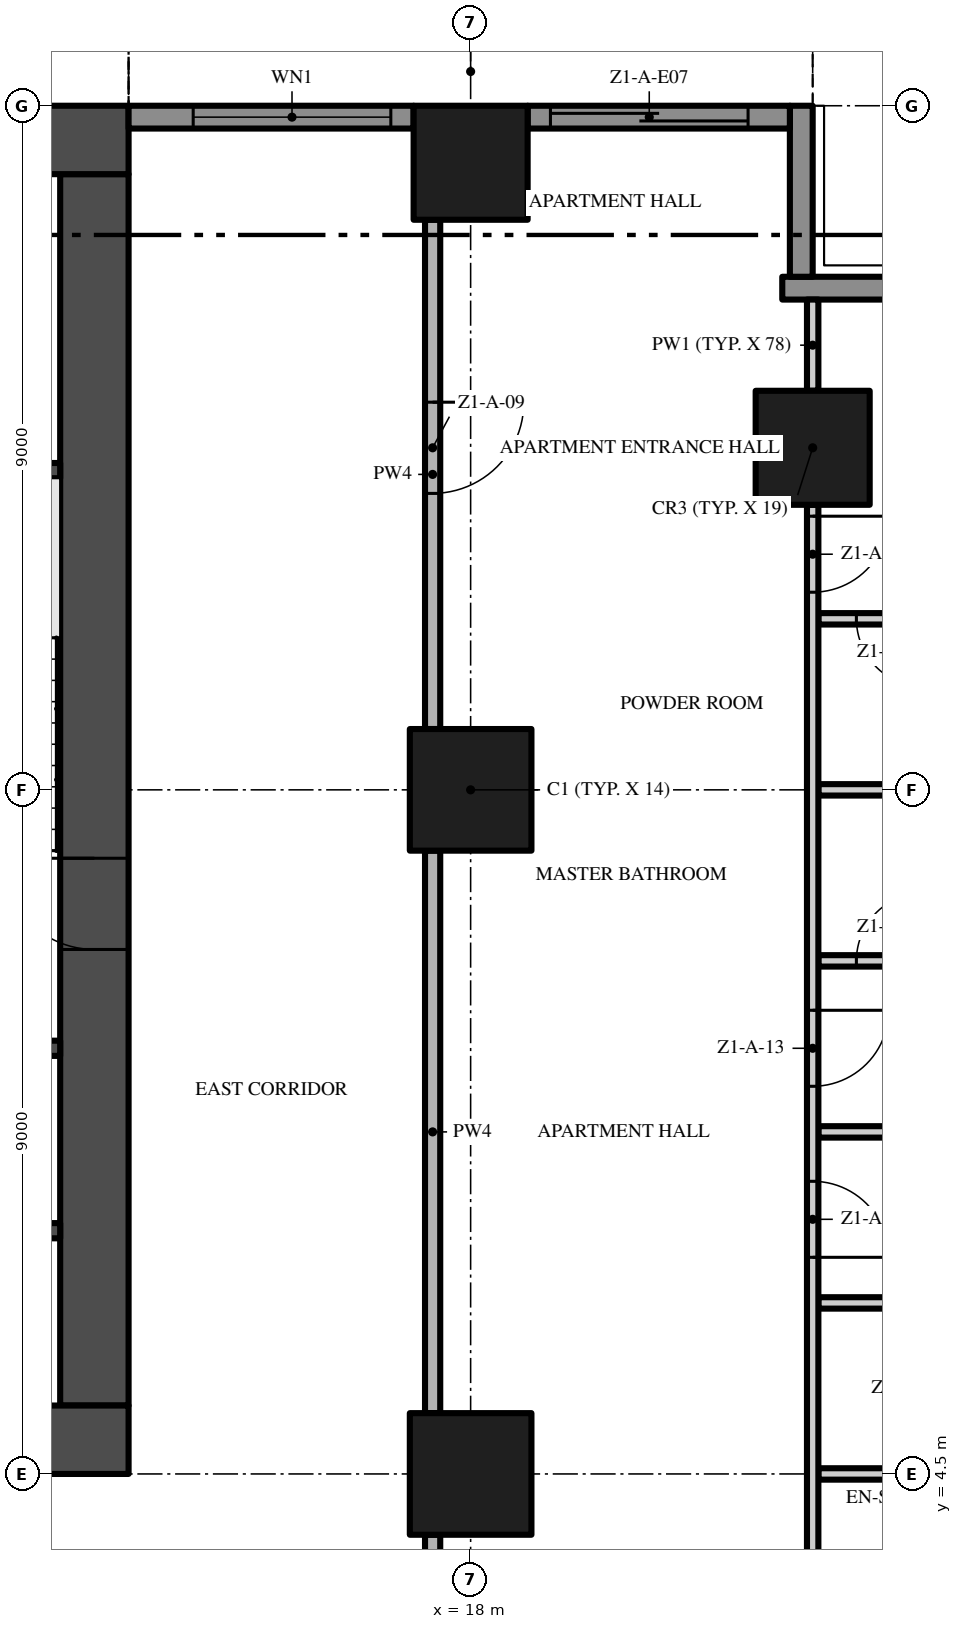
"""IFC4 building model, lengths in metres.
Left out: names, types, materials, properties, quantities, classifications, styles, units other than length and angle.
Written with IfcOpenShell. Run it as: python <this file> out.ifc"""

import sys

from ifc_helpers import new_model, si_unit, direction, frame, frame_2d, origin, origin_2d, place, context, subcontext, project, spatial, rectangle, extrude, element, fill, save


model = new_model("IFC4")
c1 = context("Model", 3, precision=1e-05, world=origin(), true_north=direction((0.0, 1.0)))
c2 = subcontext(c1, "Body", "Model", "MODEL_VIEW")
j1 = project(units=[si_unit("LENGTHUNIT", "METRE"), si_unit("PLANEANGLEUNIT", "RADIAN")], contexts=[c1])
p1 = place(None, origin())
s1 = spatial("IfcSite", under=j1, at=p1, CompositionType="ELEMENT")
p2 = place(p1, origin())
s2 = spatial("IfcBuilding", under=s1, at=p2, CompositionType="ELEMENT")
p3 = place(p2, frame((0.0, 0.0, 15.0)))
s3 = spatial("IfcBuildingStorey", under=s2, at=p3, CompositionType="ELEMENT", Elevation=15.0)
p4 = place(p3, frame((-13.5, 4.95, -0.3), z_axis=(0.0, 0.0, 1.0), x_axis=(1.0, 0.0, 0.0)))
e1 = element("IfcWall", 1, at=p4, inside=s3, PredefinedType="SHEAR", context=c2, shape_type="SweptSolid", body=[
    extrude(rectangle(XDim=27.0, YDim=0.9, at=frame_2d((13.5, 0.0))), origin(), (0.0, 0.0, 1.0), 3.8),
])
p5 = place(p4, frame((12.0, 0.0, 0.3)))
e2 = element("IfcOpeningElement", 2, at=p5, cuts=e1, PredefinedType="OPENING", context=c2, shape_type="SweptSolid", body=[
    extrude(rectangle(XDim=3.0, YDim=2.4, at=frame_2d((1.5, 1.2))), frame((0.0, 0.46, 0.0), z_axis=(0.0, -1.0, 0.0), x_axis=(1.0, 0.0, 0.0)), (0.0, 0.0, 1.0), 0.92),
])
p6 = place(p4, frame((4.9, 0.0, 0.3)))
e3 = element("IfcOpeningElement", 3, at=p6, cuts=e1, PredefinedType="OPENING", context=c2, shape_type="SweptSolid", body=[
    extrude(rectangle(XDim=1.2, YDim=2.2, at=frame_2d((0.6, 1.1))), frame((0.0, 0.46, 0.0), z_axis=(0.0, -1.0, 0.0), x_axis=(1.0, 0.0, 0.0)), (0.0, 0.0, 1.0), 0.92),
])
p7 = place(p4, frame((20.75, 0.0, 0.3)))
e4 = element("IfcOpeningElement", 4, at=p7, cuts=e1, PredefinedType="OPENING", context=c2, shape_type="SweptSolid", body=[
    extrude(rectangle(XDim=1.5, YDim=2.2, at=frame_2d((0.75, 1.1))), frame((0.0, 0.46, 0.0), z_axis=(0.0, -1.0, 0.0), x_axis=(1.0, 0.0, 0.0)), (0.0, 0.0, 1.0), 0.92),
])
p8 = place(p4, frame((17.4, 0.0, 0.3)))
e5 = element("IfcOpeningElement", 5, at=p8, cuts=e1, PredefinedType="OPENING", context=c2, shape_type="SweptSolid", body=[
    extrude(rectangle(XDim=1.2, YDim=2.2, at=frame_2d((0.6, 1.1))), frame((0.0, 0.46, 0.0), z_axis=(0.0, -1.0, 0.0), x_axis=(1.0, 0.0, 0.0)), (0.0, 0.0, 1.0), 0.92),
])
p9 = place(p3, frame((13.05, 5.4, -0.3), z_axis=(0.0, 0.0, 1.0), x_axis=(0.0, 1.0, 0.0)))
e6 = element("IfcWall", 6, at=p9, inside=s3, PredefinedType="SHEAR", context=c2, shape_type="SweptSolid", body=[
    extrude(rectangle(XDim=16.2, YDim=0.9, at=frame_2d((8.1, 0.0))), origin(), (0.0, 0.0, 1.0), 3.8),
])
p10 = place(p9, frame((6.0, 0.0, 0.3)))
e7 = element("IfcOpeningElement", 7, at=p10, cuts=e6, PredefinedType="OPENING", context=c2, shape_type="SweptSolid", body=[
    extrude(rectangle(XDim=1.2, YDim=2.2, at=frame_2d((0.6, 1.1))), frame((0.0, 0.46, 0.0), z_axis=(0.0, -1.0, 0.0), x_axis=(1.0, 0.0, 0.0)), (0.0, 0.0, 1.0), 0.92),
])
p11 = place(p3, frame((13.5, 22.05, -0.3), z_axis=(0.0, 0.0, 1.0), x_axis=(-1.0, 0.0, 0.0)))
e8 = element("IfcWall", 8, at=p11, inside=s3, PredefinedType="SHEAR", context=c2, shape_type="SweptSolid", body=[
    extrude(rectangle(XDim=27.0, YDim=0.9, at=frame_2d((13.5, 0.0))), origin(), (0.0, 0.0, 1.0), 3.8),
])
p12 = place(p3, frame((18.0, 13.5, 0.0), z_axis=(0.0, 0.0, 1.0), x_axis=(1.0, 0.0, 0.0)))
e9 = element("IfcColumn", 9, at=p12, inside=s3, PredefinedType="COLUMN", context=c2, shape_type="SweptSolid", body=[
    extrude(rectangle(XDim=1.6, YDim=1.6, at=origin_2d()), origin(), (0.0, 0.0, 1.0), 3.5),
])
p13 = place(p3, frame((18.0, 21.75, 0.0), z_axis=(0.0, 0.0, 1.0), x_axis=(1.0, 0.0, 0.0)))
e10 = element("IfcColumn", 10, at=p13, inside=s3, PredefinedType="COLUMN", context=c2, shape_type="SweptSolid", body=[
    extrude(rectangle(XDim=1.5, YDim=1.5, at=origin_2d()), origin(), (0.0, 0.0, 1.0), 3.5),
])
p14 = place(p3, frame((18.0, 4.5, 0.0), z_axis=(0.0, 0.0, 1.0), x_axis=(1.0, 0.0, 0.0)))
e11 = element("IfcColumn", 11, at=p14, inside=s3, PredefinedType="COLUMN", context=c2, shape_type="SweptSolid", body=[
    extrude(rectangle(XDim=1.6, YDim=1.6, at=origin_2d()), origin(), (0.0, 0.0, 1.0), 3.5),
])
p15 = place(p3, frame((22.5, 18.0, 0.0), z_axis=(0.0, 0.0, 1.0), x_axis=(1.0, 0.0, 0.0)))
e12 = element("IfcColumn", 12, at=p15, inside=s3, PredefinedType="COLUMN", context=c2, shape_type="SweptSolid", body=[
    extrude(rectangle(XDim=1.5, YDim=1.5, at=origin_2d()), origin(), (0.0, 0.0, 1.0), 3.5),
])
p16 = place(p3, frame((22.1, 20.1, 0.0), z_axis=(0.0, 0.0, 1.0), x_axis=(1.0, 0.0, 0.0)))
e13 = element("IfcWall", 13, at=p16, inside=s3, PredefinedType="SOLIDWALL", context=c2, shape_type="SweptSolid", body=[
    extrude(rectangle(XDim=2.35, YDim=0.3, at=frame_2d((1.175, 0.0))), origin(), (0.0, 0.0, 1.0), 3.5),
])
p17 = place(p3, frame((22.35, 22.5, 0.0), z_axis=(0.0, 0.0, 1.0), x_axis=(0.0, -1.0, 0.0)))
e14 = element("IfcWall", 14, at=p17, inside=s3, PredefinedType="SOLIDWALL", context=c2, shape_type="SweptSolid", body=[
    extrude(rectangle(XDim=2.25, YDim=0.3, at=frame_2d((1.125, 0.0))), origin(), (0.0, 0.0, 1.0), 3.5),
])
p18 = place(p3, frame((18.75, 22.35, 0.0), z_axis=(0.0, 0.0, 1.0), x_axis=(1.0, 0.0, 0.0)))
e15 = element("IfcWall", 15, at=p18, inside=s3, PredefinedType="SOLIDWALL", context=c2, shape_type="SweptSolid", body=[
    extrude(rectangle(XDim=3.45, YDim=0.3, at=frame_2d((1.725, 0.0))), origin(), (0.0, 0.0, 1.0), 3.5),
])
p19 = place(p18, frame((0.3, 0.0, 0.0)))
e16 = element("IfcOpeningElement", 16, at=p19, cuts=e15, PredefinedType="OPENING", context=c2, shape_type="SweptSolid", body=[
    extrude(rectangle(XDim=2.6, YDim=2.4, at=frame_2d((1.3, 1.2))), frame((0.0, 0.16, 0.0), z_axis=(0.0, -1.0, 0.0), x_axis=(1.0, 0.0, 0.0)), (0.0, 0.0, 1.0), 0.32),
])
p20 = place(p3, frame((13.5, 22.35, 0.0), z_axis=(0.0, 0.0, 1.0), x_axis=(1.0, 0.0, 0.0)))
e17 = element("IfcWall", 17, at=p20, inside=s3, PredefinedType="SOLIDWALL", context=c2, shape_type="SweptSolid", body=[
    extrude(rectangle(XDim=3.75, YDim=0.3, at=frame_2d((1.875, 0.0))), origin(), (0.0, 0.0, 1.0), 3.5),
])
p21 = place(p20, frame((0.85, 0.0, 0.45)))
e18 = element("IfcOpeningElement", 18, at=p21, cuts=e17, PredefinedType="OPENING", context=c2, shape_type="SweptSolid", body=[
    extrude(rectangle(XDim=2.6, YDim=2.65, at=frame_2d((1.3, 1.325))), frame((0.0, 0.16, 0.0), z_axis=(0.0, -1.0, 0.0), x_axis=(1.0, 0.0, 0.0)), (0.0, 0.0, 1.0), 0.32),
])
for number, where, z_axis, x_axis in (
    (19, (9.65, 7.7, 0.0), (0.0, 0.0, 1.0), (1.0, 0.0, 0.0)),
    (20, (9.65, 10.1, 0.0), (0.0, 0.0, 1.0), (1.0, 0.0, 0.0)),
    (21, (9.65, 17.7, 0.0), (0.0, 0.0, 1.0), (1.0, 0.0, 0.0)),
):
    element("IfcWall", number, at=place(p3, frame(where, z_axis=z_axis, x_axis=x_axis)), inside=s3, PredefinedType="SHEAR", context=c2, shape_type="SweptSolid", body=[
        extrude(rectangle(XDim=2.95, YDim=0.2, at=frame_2d((1.475, 0.0))), origin(), (0.0, 0.0, 1.0), 3.5),
    ])
p22 = place(p3, frame((22.575, 4.5, 0.0), z_axis=(0.0, 0.0, 1.0), x_axis=(1.0, 0.0, 0.0)))
e22 = element("IfcWall", 22, at=p22, inside=s3, PredefinedType="PARTITIONING", context=c2, shape_type="SweptSolid", body=[
    extrude(rectangle(XDim=2.925, YDim=0.15, at=frame_2d((1.462, 0.0))), origin(), (0.0, 0.0, 1.0), 3.5),
])
p23 = place(p3, frame((22.575, 6.75, 0.0), z_axis=(0.0, 0.0, 1.0), x_axis=(1.0, 0.0, 0.0)))
e23 = element("IfcWall", 23, at=p23, inside=s3, PredefinedType="PARTITIONING", context=c2, shape_type="SweptSolid", body=[
    extrude(rectangle(XDim=1.875, YDim=0.15, at=frame_2d((0.938, 0.0))), origin(), (0.0, 0.0, 1.0), 3.5),
])
p24 = place(p3, frame((22.575, 9.0, 0.0), z_axis=(0.0, 0.0, 1.0), x_axis=(1.0, 0.0, 0.0)))
e24 = element("IfcWall", 24, at=p24, inside=s3, PredefinedType="PARTITIONING", context=c2, shape_type="SweptSolid", body=[
    extrude(rectangle(XDim=4.125, YDim=0.15, at=frame_2d((2.062, 0.0))), origin(), (0.0, 0.0, 1.0), 3.5),
])
p25 = place(p3, frame((22.575, 11.25, 0.0), z_axis=(0.0, 0.0, 1.0), x_axis=(1.0, 0.0, 0.0)))
e25 = element("IfcWall", 25, at=p25, inside=s3, PredefinedType="PARTITIONING", context=c2, shape_type="SweptSolid", body=[
    extrude(rectangle(XDim=1.875, YDim=0.15, at=frame_2d((0.938, 0.0))), origin(), (0.0, 0.0, 1.0), 3.5),
])
p26 = place(p25, frame((0.5, 0.0, 0.0)))
e26 = element("IfcOpeningElement", 26, at=p26, cuts=e25, PredefinedType="OPENING", context=c2, shape_type="SweptSolid", body=[
    extrude(rectangle(XDim=0.9, YDim=2.1, at=frame_2d((0.45, 1.05))), frame((0.0, 0.085, 0.0), z_axis=(0.0, -1.0, 0.0), x_axis=(1.0, 0.0, 0.0)), (0.0, 0.0, 1.0), 0.17),
])
p27 = place(p3, frame((22.575, 13.5, 0.0), z_axis=(0.0, 0.0, 1.0), x_axis=(1.0, 0.0, 0.0)))
e27 = element("IfcWall", 27, at=p27, inside=s3, PredefinedType="PARTITIONING", context=c2, shape_type="SweptSolid", body=[
    extrude(rectangle(XDim=1.875, YDim=0.15, at=frame_2d((0.938, 0.0))), origin(), (0.0, 0.0, 1.0), 3.5),
])
p28 = place(p3, frame((24.45, 15.75, 0.0), z_axis=(0.0, 0.0, 1.0), x_axis=(-1.0, 0.0, 0.0)))
e28 = element("IfcWall", 28, at=p28, inside=s3, PredefinedType="PARTITIONING", context=c2, shape_type="SweptSolid", body=[
    extrude(rectangle(XDim=1.875, YDim=0.15, at=frame_2d((0.938, 0.0))), origin(), (0.0, 0.0, 1.0), 3.5),
])
p29 = place(p28, frame((0.475, 0.0, 0.0)))
e29 = element("IfcOpeningElement", 29, at=p29, cuts=e28, PredefinedType="OPENING", context=c2, shape_type="SweptSolid", body=[
    extrude(rectangle(XDim=0.9, YDim=2.1, at=frame_2d((0.45, 1.05))), frame((0.0, 0.085, 0.0), z_axis=(0.0, -1.0, 0.0), x_axis=(1.0, 0.0, 0.0)), (0.0, 0.0, 1.0), 0.17),
])
p30 = place(p3, frame((17.5, -0.2, 0.0), z_axis=(0.0, 0.0, 1.0), x_axis=(0.0, 1.0, 0.0)))
e30 = element("IfcWall", 30, at=p30, inside=s3, PredefinedType="PARTITIONING", context=c2, shape_type="SweptSolid", body=[
    extrude(rectangle(XDim=3.9, YDim=0.2, at=frame_2d((1.95, 0.0))), origin(), (0.0, 0.0, 1.0), 3.5),
])
p31 = place(p3, frame((17.5, 5.3, 0.0), z_axis=(0.0, 0.0, 1.0), x_axis=(0.0, 1.0, 0.0)))
e31 = element("IfcWall", 31, at=p31, inside=s3, PredefinedType="PARTITIONING", context=c2, shape_type="SweptSolid", body=[
    extrude(rectangle(XDim=7.4, YDim=0.2, at=frame_2d((3.7, 0.0))), origin(), (0.0, 0.0, 1.0), 3.5),
])
p32 = place(p3, frame((17.5, 21.0, 0.0), z_axis=(0.0, 0.0, 1.0), x_axis=(0.0, -1.0, 0.0)))
e32 = element("IfcWall", 32, at=p32, inside=s3, PredefinedType="PARTITIONING", context=c2, shape_type="SweptSolid", body=[
    extrude(rectangle(XDim=6.7, YDim=0.2, at=frame_2d((3.35, 0.0))), origin(), (0.0, 0.0, 1.0), 3.5),
])
p33 = place(p32, frame((2.4, 0.0, 0.0)))
e33 = element("IfcOpeningElement", 33, at=p33, cuts=e32, PredefinedType="OPENING", context=c2, shape_type="SweptSolid", body=[
    extrude(rectangle(XDim=1.2, YDim=2.4, at=frame_2d((0.6, 1.2))), frame((0.0, 0.11, 0.0), z_axis=(0.0, -1.0, 0.0), x_axis=(1.0, 0.0, 0.0)), (0.0, 0.0, 1.0), 0.22),
])
p34 = place(p3, frame((22.5, 17.25, 0.0), z_axis=(0.0, 0.0, 1.0), x_axis=(0.0, -1.0, 0.0)))
e34 = element("IfcWall", 34, at=p34, inside=s3, PredefinedType="PARTITIONING", context=c2, shape_type="SweptSolid", body=[
    extrude(rectangle(XDim=17.15, YDim=0.15, at=frame_2d((8.575, 0.0))), origin(), (0.0, 0.0, 1.0), 3.5),
])
p35 = place(p34, frame((14.5, 0.0, 0.0)))
e35 = element("IfcOpeningElement", 35, at=p35, cuts=e34, PredefinedType="OPENING", context=c2, shape_type="SweptSolid", body=[
    extrude(rectangle(XDim=1.0, YDim=2.4, at=frame_2d((0.5, 1.2))), frame((0.0, 0.085, 0.0), z_axis=(0.0, -1.0, 0.0), x_axis=(1.0, 0.0, 0.0)), (0.0, 0.0, 1.0), 0.17),
])
p36 = place(p34, frame((8.9, 0.0, 0.0)))
e36 = element("IfcOpeningElement", 36, at=p36, cuts=e34, PredefinedType="OPENING", context=c2, shape_type="SweptSolid", body=[
    extrude(rectangle(XDim=1.0, YDim=2.4, at=frame_2d((0.5, 1.2))), frame((0.0, 0.085, 0.0), z_axis=(0.0, -1.0, 0.0), x_axis=(1.0, 0.0, 0.0)), (0.0, 0.0, 1.0), 0.17),
])
p37 = place(p34, frame((6.65, 0.0, 0.0)))
e37 = element("IfcOpeningElement", 37, at=p37, cuts=e34, PredefinedType="OPENING", context=c2, shape_type="SweptSolid", body=[
    extrude(rectangle(XDim=1.0, YDim=2.4, at=frame_2d((0.5, 1.2))), frame((0.0, 0.085, 0.0), z_axis=(0.0, -1.0, 0.0), x_axis=(1.0, 0.0, 0.0)), (0.0, 0.0, 1.0), 0.17),
])
p38 = place(p34, frame((0.15, 0.0, 0.0)))
e38 = element("IfcOpeningElement", 38, at=p38, cuts=e34, PredefinedType="OPENING", context=c2, shape_type="SweptSolid", body=[
    extrude(rectangle(XDim=1.0, YDim=2.4, at=frame_2d((0.5, 1.2))), frame((0.0, 0.085, 0.0), z_axis=(0.0, -1.0, 0.0), x_axis=(1.0, 0.0, 0.0)), (0.0, 0.0, 1.0), 0.17),
])
p39 = place(p3, frame((22.5, 18.75, 0.0), z_axis=(0.0, 0.0, 1.0), x_axis=(0.0, 1.0, 0.0)))
e39 = element("IfcWall", 39, at=p39, inside=s3, PredefinedType="PARTITIONING", context=c2, shape_type="SweptSolid", body=[
    extrude(rectangle(XDim=1.2, YDim=0.15, at=frame_2d((0.6, 0.0))), origin(), (0.0, 0.0, 1.0), 3.5),
])
p40 = place(p19, origin())
e40 = element("IfcDoor", 40, at=p40, inside=s3, OperationType="SINGLE_SWING_LEFT", PredefinedType="DOOR", context=c2, shape_type="SweptSolid", body=[
    extrude(rectangle(XDim=2.6, YDim=2.4, at=frame_2d((1.3, 1.2))), frame((0.0, 0.025, 0.0), z_axis=(0.0, -1.0, 0.0), x_axis=(1.0, 0.0, 0.0)), (0.0, 0.0, 1.0), 0.05),
])
fill(e16, e40)
p41 = place(p21, origin())
e41 = element("IfcWindow", 41, at=p41, inside=s3, PartitioningType="SINGLE_PANEL", PredefinedType="WINDOW", context=c2, shape_type="SweptSolid", body=[
    extrude(rectangle(XDim=2.6, YDim=2.65, at=frame_2d((1.3, 1.325))), frame((0.0, 0.03, 0.0), z_axis=(0.0, -1.0, 0.0), x_axis=(1.0, 0.0, 0.0)), (0.0, 0.0, 1.0), 0.06),
])
fill(e18, e41)
p42 = place(p10, frame((1.2, 0.0, 0.0), z_axis=(0.0, 0.0, 1.0), x_axis=(-1.0, 0.0, 0.0)))
e42 = element("IfcDoor", 42, at=p42, inside=s3, OperationType="SINGLE_SWING_LEFT", PredefinedType="DOOR", context=c2, shape_type="SweptSolid", body=[
    extrude(rectangle(XDim=1.2, YDim=2.2, at=frame_2d((0.6, 1.1))), frame((0.0, 0.025, 0.0), z_axis=(0.0, -1.0, 0.0), x_axis=(1.0, 0.0, 0.0)), (0.0, 0.0, 1.0), 0.05),
])
fill(e7, e42)
p43 = place(p33, origin())
e43 = element("IfcDoor", 43, at=p43, inside=s3, OperationType="SINGLE_SWING_LEFT", PredefinedType="DOOR", context=c2, shape_type="SweptSolid", body=[
    extrude(rectangle(XDim=1.2, YDim=2.4, at=frame_2d((0.6, 1.2))), frame((0.0, 0.025, 0.0), z_axis=(0.0, -1.0, 0.0), x_axis=(1.0, 0.0, 0.0)), (0.0, 0.0, 1.0), 0.05),
])
fill(e33, e43)
p44 = place(p36, origin())
e44 = element("IfcDoor", 44, at=p44, inside=s3, OperationType="SINGLE_SWING_RIGHT", PredefinedType="DOOR", context=c2, shape_type="SweptSolid", body=[
    extrude(rectangle(XDim=1.0, YDim=2.4, at=frame_2d((0.5, 1.2))), frame((0.0, 0.025, 0.0), z_axis=(0.0, -1.0, 0.0), x_axis=(1.0, 0.0, 0.0)), (0.0, 0.0, 1.0), 0.05),
])
fill(e36, e44)
p45 = place(p37, origin())
e45 = element("IfcDoor", 45, at=p45, inside=s3, OperationType="SINGLE_SWING_LEFT", PredefinedType="DOOR", context=c2, shape_type="SweptSolid", body=[
    extrude(rectangle(XDim=1.0, YDim=2.4, at=frame_2d((0.5, 1.2))), frame((0.0, 0.025, 0.0), z_axis=(0.0, -1.0, 0.0), x_axis=(1.0, 0.0, 0.0)), (0.0, 0.0, 1.0), 0.05),
])
fill(e37, e45)
p46 = place(p26, origin())
e46 = element("IfcDoor", 46, at=p46, inside=s3, OperationType="SINGLE_SWING_RIGHT", PredefinedType="DOOR", context=c2, shape_type="SweptSolid", body=[
    extrude(rectangle(XDim=0.9, YDim=2.1, at=frame_2d((0.45, 1.05))), frame((0.0, 0.025, 0.0), z_axis=(0.0, -1.0, 0.0), x_axis=(1.0, 0.0, 0.0)), (0.0, 0.0, 1.0), 0.05),
])
fill(e26, e46)
p47 = place(p38, origin())
e47 = element("IfcDoor", 47, at=p47, inside=s3, OperationType="SINGLE_SWING_LEFT", PredefinedType="DOOR", context=c2, shape_type="SweptSolid", body=[
    extrude(rectangle(XDim=1.0, YDim=2.4, at=frame_2d((0.5, 1.2))), frame((0.0, 0.025, 0.0), z_axis=(0.0, -1.0, 0.0), x_axis=(1.0, 0.0, 0.0)), (0.0, 0.0, 1.0), 0.05),
])
fill(e38, e47)
p48 = place(p29, origin())
e48 = element("IfcDoor", 48, at=p48, inside=s3, OperationType="SINGLE_SWING_LEFT", PredefinedType="DOOR", context=c2, shape_type="SweptSolid", body=[
    extrude(rectangle(XDim=0.9, YDim=2.1, at=frame_2d((0.45, 1.05))), frame((0.0, 0.025, 0.0), z_axis=(0.0, -1.0, 0.0), x_axis=(1.0, 0.0, 0.0)), (0.0, 0.0, 1.0), 0.05),
])
fill(e29, e48)
save(model, sys.argv[1])
